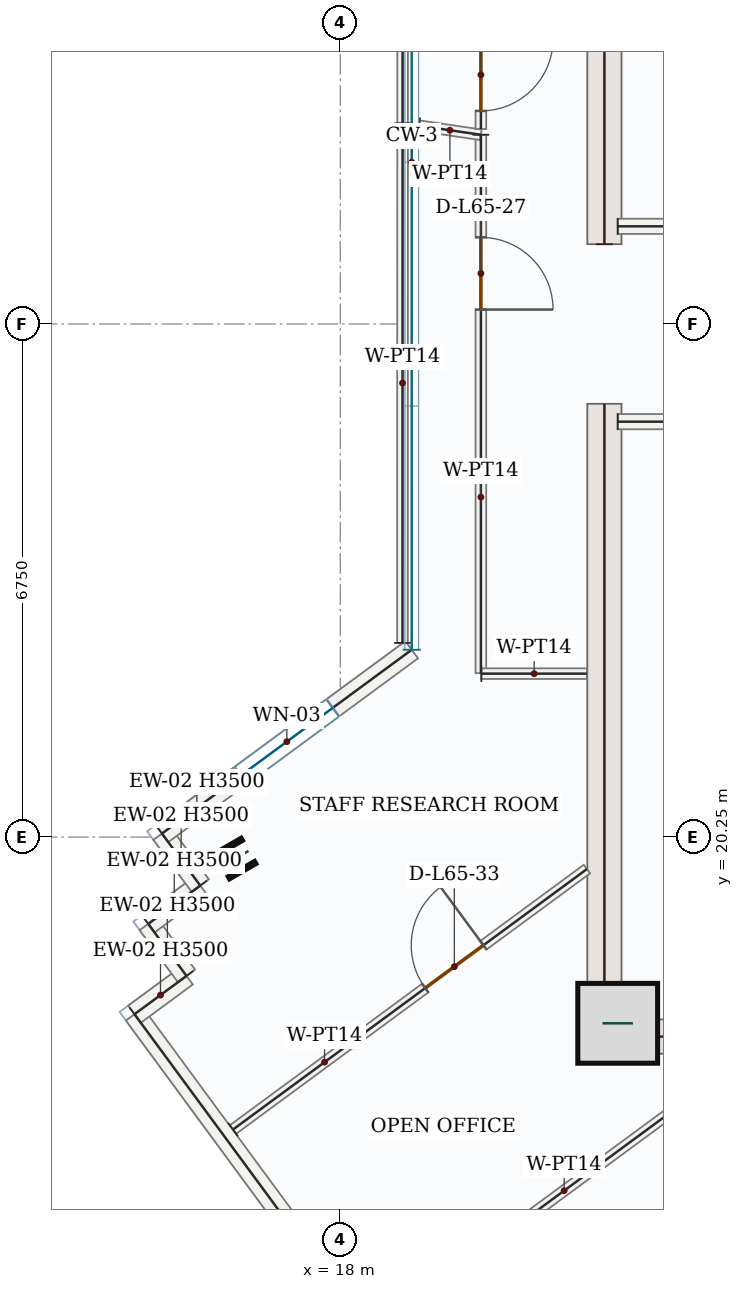
"""IFC4 building model, lengths in metres.
Left out: names, types, materials, properties, quantities, classifications, styles, units other than length and angle.
Written with IfcOpenShell. Run it as: python <this file> out.ifc"""

import sys

from ifc_helpers import new_model, si_unit, direction, frame, frame_2d, origin, origin_2d, place, context, subcontext, project, spatial, rectangle, i_section, extrude, source, transform, mapped, element, fill, save


model = new_model("IFC4")
c1 = context("Model", 3, precision=1e-05, world=origin(), true_north=direction((0.0, 1.0)))
c2 = subcontext(c1, "Body", "Model", "MODEL_VIEW")
j1 = project(units=[si_unit("LENGTHUNIT", "METRE"), si_unit("PLANEANGLEUNIT", "RADIAN")], contexts=[c1])
p1 = place(None, origin())
s1 = spatial("IfcSite", under=j1, at=p1, CompositionType="ELEMENT")
p2 = place(p1, origin())
s2 = spatial("IfcBuilding", under=s1, at=p2, CompositionType="ELEMENT")
p3 = place(p2, frame((0.0, 0.0, 272.85)))
s3 = spatial("IfcBuildingStorey", under=s2, at=p3, CompositionType="ELEMENT", Elevation=272.85)
m1 = source(origin(), c2, "Body", "SweptSolid", [
    extrude(rectangle(XDim=8.55, YDim=0.45, at=frame_2d((4.275, 0.0))), origin(), (0.0, 0.0, 1.0), 3.5),
])
for number, where, z_axis, x_axis in (
    (1, (21.475, 17.4, 0.0), (0.0, 0.0, 1.0), (0.0, 1.0, 0.0)),
    (2, (21.475, 28.05, 0.0), (0.0, 0.0, 1.0), (0.0, 1.0, 0.0)),
):
    element("IfcWall", number, at=place(p3, frame(where, z_axis=z_axis, x_axis=x_axis)), inside=s3, PredefinedType="SHEAR", context=c2, shape_type="MappedRepresentation", body=[
        mapped(m1, transform((0.0, 0.0, 0.0), x_axis=(1.0, 0.0, 0.0), y_axis=(0.0, 1.0, 0.0), z_axis=(0.0, 0.0, 1.0), scale=1.0)),
    ])
m2 = source(origin(), c2, "Body", "SweptSolid", [
    extrude(rectangle(XDim=7.1, YDim=0.45, at=frame_2d((3.55, 0.0))), origin(), (0.0, 0.0, 1.0), 3.5),
])
p4 = place(p3, frame((21.7, 17.625, 0.0), z_axis=(0.0, 0.0, 1.0), x_axis=(1.0, 0.0, 0.0)))
e3 = element("IfcWall", 3, at=p4, inside=s3, PredefinedType="SHEAR", context=c2, shape_type="MappedRepresentation", body=[
    mapped(m2, transform((0.0, 0.0, 0.0), x_axis=(1.0, 0.0, 0.0), y_axis=(0.0, 1.0, 0.0), z_axis=(0.0, 0.0, 1.0), scale=1.0)),
])
m3 = source(origin(), c2, "Body", "SweptSolid", [
    extrude(rectangle(XDim=1.05, YDim=1.05, at=origin_2d()), origin(), (0.0, 0.0, 1.0), 3.75),
])
p5 = place(p3, frame((21.65, 17.8, 0.0), z_axis=(0.0, 0.0, 1.0), x_axis=(1.0, 0.0, 0.0)))
e4 = element("IfcColumn", 4, at=p5, inside=s3, PredefinedType="COLUMN", context=c2, shape_type="MappedRepresentation", body=[
    mapped(m3, transform((0.0, 0.0, 0.0), x_axis=(1.0, 0.0, 0.0), y_axis=(0.0, 1.0, 0.0), z_axis=(0.0, 0.0, 1.0), scale=1.0)),
])
m4 = source(origin(), c2, "Body", "SweptSolid", [
    extrude(i_section(OverallWidth=0.399, OverallDepth=0.386, WebThickness=0.021, FlangeThickness=0.033, FilletRadius=0.018, at=origin_2d()), origin(), (0.0, 0.0, 1.0), 3.75),
])
p6 = place(p3, frame((16.62, 19.968, 0.0), z_axis=(0.0, 0.0, 1.0), x_axis=(0.866025403784, 0.5, 0.0)))
e5 = element("IfcColumn", 5, at=p6, inside=s3, PredefinedType="COLUMN", context=c2, shape_type="MappedRepresentation", body=[
    mapped(m4, transform((0.0, 0.0, 0.0), x_axis=(1.0, 0.0, 0.0), y_axis=(0.0, 1.0, 0.0), z_axis=(0.0, 0.0, 1.0), scale=1.0)),
])
m5 = source(origin(), c2, "Body", "SweptSolid", [
    extrude(rectangle(XDim=9.92, YDim=0.28, at=frame_2d((4.96, 0.0))), origin(), (0.0, 0.0, 1.0), 3.5),
])
p7 = place(p3, frame((21.173, 9.93, 0.0), z_axis=(0.0, 0.0, 1.0), x_axis=(-0.592722097771, 0.805407049146, 0.0)))
e6 = element("IfcWall", 6, at=p7, inside=s3, PredefinedType="SOLIDWALL", context=c2, shape_type="MappedRepresentation", body=[
    mapped(m5, transform((0.0, 0.0, 0.0), x_axis=(1.0, 0.0, 0.0), y_axis=(0.0, 1.0, 0.0), z_axis=(0.0, 0.0, 1.0), scale=1.0)),
])
m6 = source(origin(), c2, "Body", "SweptSolid", [
    extrude(rectangle(XDim=0.85, YDim=0.28, at=frame_2d((0.425, 0.0))), origin(), (0.0, 0.0, 1.0), 3.5),
])
for number, where, z_axis, x_axis in (
    (7, (15.293, 17.919, 0.0), (0.0, 0.0, 1.0), (0.805, 0.593, 0.0)),
    (8, (15.977, 18.423, 0.0), (0.0, 0.0, 1.0), (-0.593, 0.805, 0.0)),
):
    element("IfcWall", number, at=place(p3, frame(where, z_axis=z_axis, x_axis=x_axis)), inside=s3, PredefinedType="SOLIDWALL", context=c2, shape_type="MappedRepresentation", body=[
        mapped(m6, transform((0.0, 0.0, 0.0), x_axis=(1.0, 0.0, 0.0), y_axis=(0.0, 1.0, 0.0), z_axis=(0.0, 0.0, 1.0), scale=1.0)),
    ])
m7 = source(origin(), c2, "Body", "SweptSolid", [
    extrude(rectangle(XDim=0.85, YDim=0.28, at=frame_2d((0.425, 0.0))), origin(), (0.0, 0.0, 1.0), 3.5),
])
p8 = place(p3, frame((15.473, 19.108, 0.0), z_axis=(0.0, 0.0, 1.0), x_axis=(0.805445398986, 0.592669983425, 0.0)))
e9 = element("IfcWall", 9, at=p8, inside=s3, PredefinedType="SOLIDWALL", context=c2, shape_type="MappedRepresentation", body=[
    mapped(m7, transform((0.0, 0.0, 0.0), x_axis=(1.0, 0.0, 0.0), y_axis=(0.0, 1.0, 0.0), z_axis=(0.0, 0.0, 1.0), scale=1.0)),
])
p9 = place(p3, frame((16.158, 19.612, 0.0), z_axis=(0.0, 0.0, 1.0), x_axis=(-0.592807079659, 0.80534450163, 0.0)))
e10 = element("IfcWall", 10, at=p9, inside=s3, PredefinedType="SOLIDWALL", context=c2, shape_type="MappedRepresentation", body=[
    mapped(m6, transform((0.0, 0.0, 0.0), x_axis=(1.0, 0.0, 0.0), y_axis=(0.0, 1.0, 0.0), z_axis=(0.0, 0.0, 1.0), scale=1.0)),
])
p10 = place(p3, frame((15.654, 20.296, 0.0), z_axis=(0.0, 0.0, 1.0), x_axis=(0.805410687764, 0.592717153486, 0.0)))
e11 = element("IfcWall", 11, at=p10, inside=s3, PredefinedType="SOLIDWALL", context=c2, shape_type="SweptSolid", body=[
    extrude(rectangle(XDim=4.079, YDim=0.28, at=frame_2d((2.04, 0.0))), origin(), (0.0, 0.0, 1.0), 3.5),
])
p11 = place(p10, frame((1.29, 0.0, 0.85)))
e12 = element("IfcOpeningElement", 12, at=p11, cuts=e11, PredefinedType="OPENING", context=c2, shape_type="SweptSolid", body=[
    extrude(rectangle(XDim=1.5, YDim=1.5, at=frame_2d((0.75, 0.75))), frame((0.0, 0.15, 0.0), z_axis=(0.0, -1.0, 0.0), x_axis=(1.0, 0.0, 0.0)), (0.0, 0.0, 1.0), 0.3),
])
m8 = source(origin(), c2, "Body", "SweptSolid", [
    extrude(rectangle(XDim=4.25, YDim=0.2, at=frame_2d((2.125, 0.0))), origin(), (0.0, 0.0, 1.0), 3.5),
])
for number, where, z_axis, x_axis in (
    (13, (21.65, 25.715, 0.0), (0.0, 0.0, 1.0), (1.0, 0.0, 0.0)),
    (14, (21.65, 28.285, 0.0), (0.0, 0.0, 1.0), (1.0, 0.0, 0.0)),
):
    element("IfcWall", number, at=place(p3, frame(where, z_axis=z_axis, x_axis=x_axis)), inside=s3, PredefinedType="SOLIDWALL", context=c2, shape_type="MappedRepresentation", body=[
        mapped(m8, transform((0.0, 0.0, 0.0), x_axis=(1.0, 0.0, 0.0), y_axis=(0.0, 1.0, 0.0), z_axis=(0.0, 0.0, 1.0), scale=1.0)),
    ])
m9 = source(origin(), c2, "Body", "SweptSolid", [
    extrude(rectangle(XDim=6.063, YDim=0.14, at=frame_2d((3.032, 0.0))), origin(), (0.0, 0.0, 1.0), 3.5),
])
p12 = place(p3, frame((23.387, 17.395, 0.0), z_axis=(0.0, 0.0, 1.0), x_axis=(-0.805422045282, -0.59270172007, 0.0)))
e15 = element("IfcWall", 15, at=p12, inside=s3, PredefinedType="PARTITIONING", context=c2, shape_type="MappedRepresentation", body=[
    mapped(m9, transform((0.0, 0.0, 0.0), x_axis=(1.0, 0.0, 0.0), y_axis=(0.0, 1.0, 0.0), z_axis=(0.0, 0.0, 1.0), scale=1.0)),
])
p13 = place(p3, frame((16.589, 16.403, 0.0), z_axis=(0.0, 0.0, 1.0), x_axis=(0.80540492624, 0.592724982423, 0.0)))
e16 = element("IfcWall", 16, at=p13, inside=s3, PredefinedType="PARTITIONING", context=c2, shape_type="SweptSolid", body=[
    extrude(rectangle(XDim=5.781, YDim=0.14, at=frame_2d((2.891, 0.0))), origin(), (0.0, 0.0, 1.0), 3.5),
])
p14 = place(p13, frame((3.14, 0.0, 0.0)))
e17 = element("IfcOpeningElement", 17, at=p14, cuts=e16, PredefinedType="OPENING", context=c2, shape_type="SweptSolid", body=[
    extrude(rectangle(XDim=0.95, YDim=2.15, at=frame_2d((0.475, 1.075))), frame((0.0, 0.08, 0.0), z_axis=(0.0, -1.0, 0.0), x_axis=(1.0, 0.0, 0.0)), (0.0, 0.0, 1.0), 0.16),
])
p15 = place(p3, frame((19.85, 29.49, 0.0), z_axis=(0.0, 0.0, 1.0), x_axis=(0.0, -1.0, 0.0)))
e18 = element("IfcWall", 18, at=p15, inside=s3, PredefinedType="PARTITIONING", context=c2, shape_type="SweptSolid", body=[
    extrude(rectangle(XDim=7.083, YDim=0.14, at=frame_2d((3.542, 0.0))), origin(), (0.0, 0.0, 1.0), 3.5),
])
p16 = place(p15, frame((1.349, 0.0, 0.0)))
e19 = element("IfcOpeningElement", 19, at=p16, cuts=e18, PredefinedType="OPENING", context=c2, shape_type="SweptSolid", body=[
    extrude(rectangle(XDim=0.95, YDim=2.15, at=frame_2d((0.475, 1.075))), frame((0.0, 0.08, 0.0), z_axis=(0.0, -1.0, 0.0), x_axis=(1.0, 0.0, 0.0)), (0.0, 0.0, 1.0), 0.16),
])
m10 = source(origin(), c2, "Body", "SweptSolid", [
    extrude(rectangle(XDim=1.389, YDim=0.14, at=frame_2d((0.695, 0.0))), origin(), (0.0, 0.0, 1.0), 3.5),
])
p17 = place(p3, frame((19.856, 22.4, 0.0), z_axis=(0.0, 0.0, 1.0), x_axis=(1.0, 0.0, 0.0)))
e20 = element("IfcWall", 20, at=p17, inside=s3, PredefinedType="PARTITIONING", context=c2, shape_type="MappedRepresentation", body=[
    mapped(m10, transform((0.0, 0.0, 0.0), x_axis=(1.0, 0.0, 0.0), y_axis=(0.0, 1.0, 0.0), z_axis=(0.0, 0.0, 1.0), scale=1.0)),
])
m11 = source(origin(), c2, "Body", "SweptSolid", [
    extrude(rectangle(XDim=6.836, YDim=0.14, at=frame_2d((3.418, 0.0))), origin(), (0.0, 0.0, 1.0), 3.5),
])
p18 = place(p3, frame((18.818, 22.805, 0.0), z_axis=(0.0, 0.0, 1.0), x_axis=(0.000285724478, 0.999999959181, 0.0)))
e21 = element("IfcWall", 21, at=p18, inside=s3, PredefinedType="PARTITIONING", context=c2, shape_type="MappedRepresentation", body=[
    mapped(m11, transform((0.0, 0.0, 0.0), x_axis=(1.0, 0.0, 0.0), y_axis=(0.0, 1.0, 0.0), z_axis=(0.0, 0.0, 1.0), scale=1.0)),
])
m12 = source(origin(), c2, "Body", "SweptSolid", [
    extrude(rectangle(XDim=0.824, YDim=0.14, at=frame_2d((0.412, 0.0))), origin(), (0.0, 0.0, 1.0), 3.5),
])
p19 = place(p3, frame((19.035, 29.609, 0.0), z_axis=(0.0, 0.0, 1.0), x_axis=(0.989445525715, -0.144905319579, 0.0)))
e22 = element("IfcWall", 22, at=p19, inside=s3, PredefinedType="PARTITIONING", context=c2, shape_type="MappedRepresentation", body=[
    mapped(m12, transform((0.0, 0.0, 0.0), x_axis=(1.0, 0.0, 0.0), y_axis=(0.0, 1.0, 0.0), z_axis=(0.0, 0.0, 1.0), scale=1.0)),
])
p20 = place(p3, frame((19.851, 31.596, 0.0), z_axis=(0.0, 0.0, 1.0), x_axis=(-0.000240384608, -0.999999971108, 0.0)))
e23 = element("IfcWall", 23, at=p20, inside=s3, PredefinedType="PARTITIONING", context=c2, shape_type="SweptSolid", body=[
    extrude(rectangle(XDim=2.031, YDim=0.14, at=frame_2d((1.016, 0.0))), origin(), (0.0, 0.0, 1.0), 3.5),
])
p21 = place(p20, frame((0.844, 0.0, 0.0)))
e24 = element("IfcOpeningElement", 24, at=p21, cuts=e23, PredefinedType="OPENING", context=c2, shape_type="SweptSolid", body=[
    extrude(rectangle(XDim=0.95, YDim=2.15, at=frame_2d((0.475, 1.075))), frame((0.0, 0.08, 0.0), z_axis=(0.0, -1.0, 0.0), x_axis=(1.0, 0.0, 0.0)), (0.0, 0.0, 1.0), 0.16),
])
m13 = source(origin(), c2, "Body", "SweptSolid", [
    extrude(rectangle(XDim=5.951, YDim=0.14, at=frame_2d((2.976, 0.0))), origin(), (0.0, 0.0, 1.0), 3.5),
])
p22 = place(p3, frame((18.82, 29.64, 0.0), z_axis=(0.0, 0.0, 1.0), x_axis=(0.0, 1.0, 0.0)))
e25 = element("IfcWall", 25, at=p22, inside=s3, PredefinedType="PARTITIONING", context=c2, shape_type="MappedRepresentation", body=[
    mapped(m13, transform((0.0, 0.0, 0.0), x_axis=(1.0, 0.0, 0.0), y_axis=(0.0, 1.0, 0.0), z_axis=(0.0, 0.0, 1.0), scale=1.0)),
])
m14 = source(origin(), c2, "Body", "SweptSolid", [
    extrude(rectangle(XDim=1.5, YDim=1.5, at=frame_2d((0.75, 0.75))), frame((0.0, 0.03, 0.0), z_axis=(0.0, -1.0, 0.0), x_axis=(1.0, 0.0, 0.0)), (0.0, 0.0, 1.0), 0.06),
])
p23 = place(p11, origin())
e26 = element("IfcWindow", 26, at=p23, inside=s3, PartitioningType="SINGLE_PANEL", PredefinedType="WINDOW", context=c2, shape_type="MappedRepresentation", body=[
    mapped(m14, transform((0.0, 0.0, 0.0), x_axis=(1.0, 0.0, 0.0), y_axis=(0.0, 1.0, 0.0), z_axis=(0.0, 0.0, 1.0), scale=1.0)),
])
fill(e12, e26)
m15 = source(origin(), c2, "Body", "SweptSolid", [
    extrude(rectangle(XDim=0.95, YDim=2.15, at=frame_2d((0.475, 1.075))), frame((0.0, 0.025, 0.0), z_axis=(0.0, -1.0, 0.0), x_axis=(1.0, 0.0, 0.0)), (0.0, 0.0, 1.0), 0.05),
])
p24 = place(p21, origin())
e27 = element("IfcDoor", 27, at=p24, inside=s3, OperationType="SINGLE_SWING_LEFT", PredefinedType="DOOR", context=c2, shape_type="MappedRepresentation", body=[
    mapped(m15, transform((0.0, 0.0, 0.0), x_axis=(1.0, 0.0, 0.0), y_axis=(0.0, 1.0, 0.0), z_axis=(0.0, 0.0, 1.0), scale=1.0)),
])
fill(e24, e27)
p25 = place(p16, origin())
e28 = element("IfcDoor", 28, at=p25, inside=s3, OperationType="SINGLE_SWING_RIGHT", PredefinedType="DOOR", context=c2, shape_type="MappedRepresentation", body=[
    mapped(m15, transform((0.0, 0.0, 0.0), x_axis=(1.0, 0.0, 0.0), y_axis=(0.0, 1.0, 0.0), z_axis=(0.0, 0.0, 1.0), scale=1.0)),
])
fill(e19, e28)
p26 = place(p14, origin())
e29 = element("IfcDoor", 29, at=p26, inside=s3, OperationType="SINGLE_SWING_RIGHT", PredefinedType="DOOR", context=c2, shape_type="MappedRepresentation", body=[
    mapped(m15, transform((0.0, 0.0, 0.0), x_axis=(1.0, 0.0, 0.0), y_axis=(0.0, 1.0, 0.0), z_axis=(0.0, 0.0, 1.0), scale=1.0)),
])
fill(e17, e29)
save(model, sys.argv[1])
